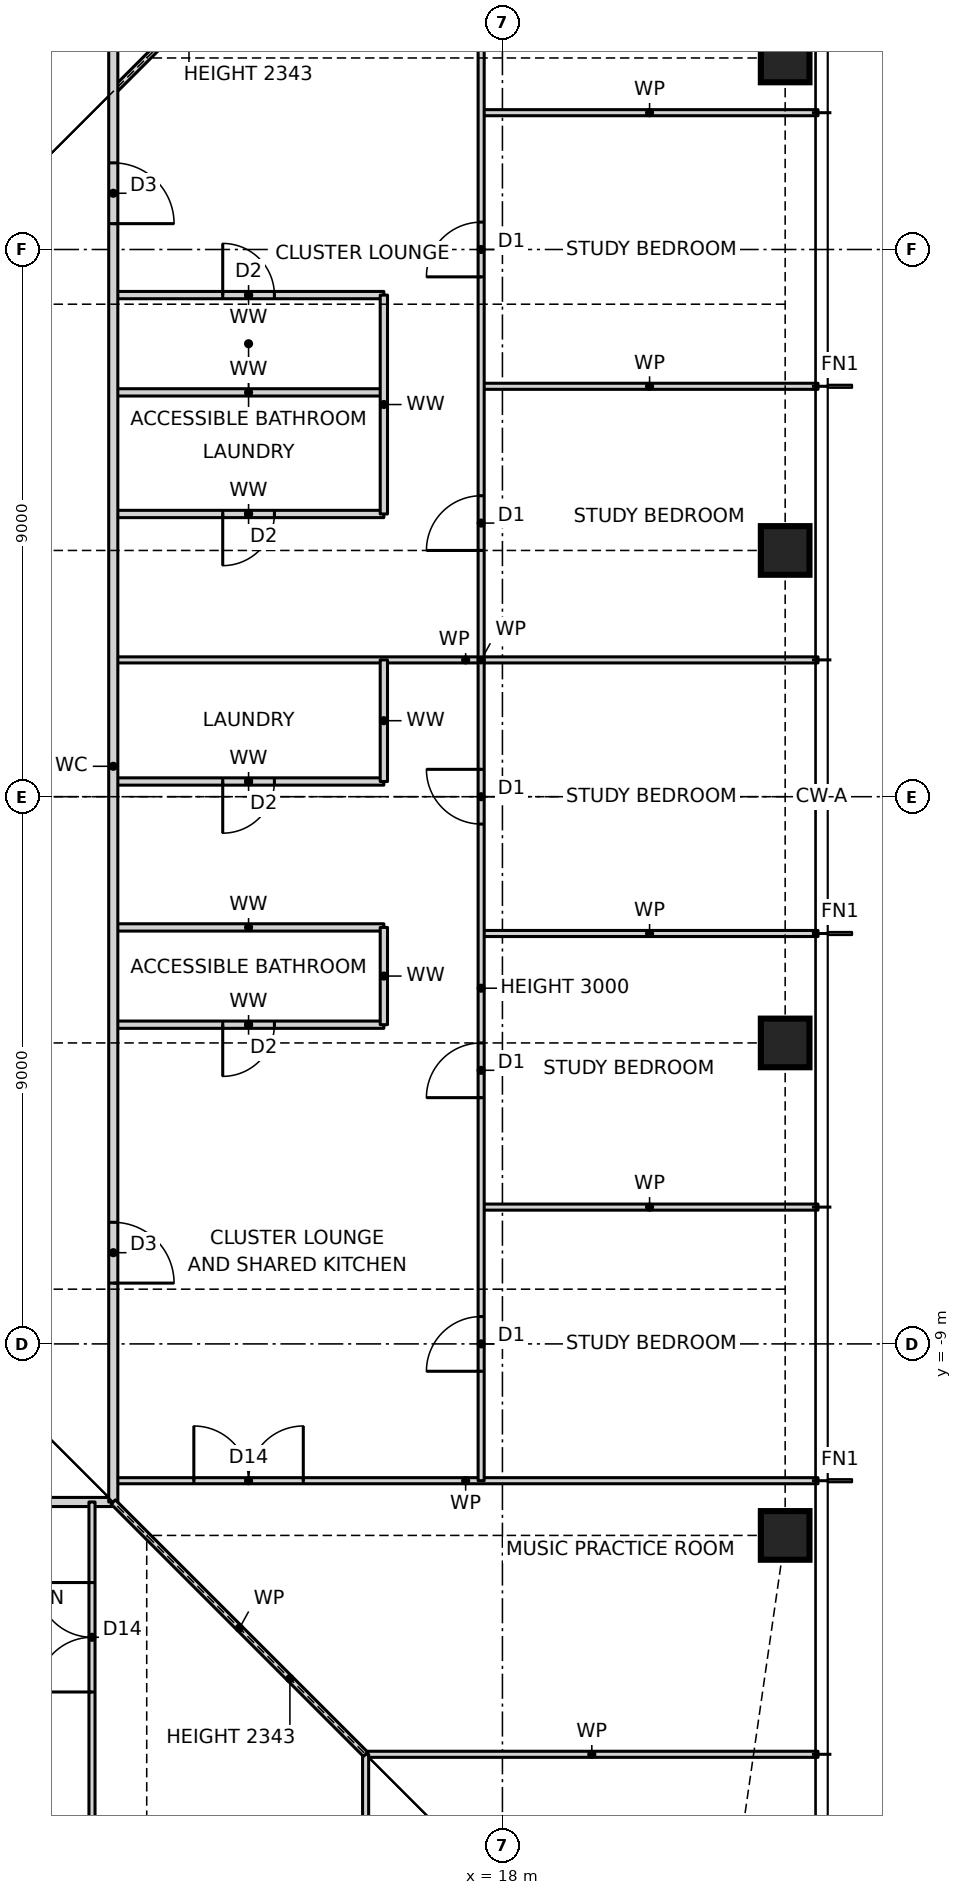
"""IFC4 building model, lengths in metres.
Left out: names, types, materials, properties, quantities, classifications, styles, units other than length and angle.
Written with IfcOpenShell. Run it as: python <this file> out.ifc"""

import sys

from ifc_helpers import new_model, si_unit, direction, frame, frame_2d, origin, origin_2d, place, context, subcontext, project, spatial, rectangle, hollow_rectangle, extrude, element, fill, save


model = new_model("IFC4")
c1 = context("Model", 3, precision=1e-05, world=origin(), true_north=direction((0.0, 1.0)))
c2 = subcontext(c1, "Body", "Model", "MODEL_VIEW")
j1 = project(units=[si_unit("LENGTHUNIT", "METRE"), si_unit("PLANEANGLEUNIT", "RADIAN")], contexts=[c1])
p1 = place(None, origin())
s1 = spatial("IfcSite", under=j1, at=p1, CompositionType="ELEMENT")
p2 = place(p1, origin())
s2 = spatial("IfcBuilding", under=s1, at=p2, CompositionType="ELEMENT")
p3 = place(p2, frame((0.0, 0.0, 43.0)))
s3 = spatial("IfcBuildingStorey", under=s2, at=p3, CompositionType="ELEMENT", Elevation=43.0)
for number, where, z_axis, x_axis in (
    (1, (22.65, -12.15, 0.0), (0.0, 0.0, 1.0), (1.0, 0.0, 0.0)),
    (2, (22.65, -4.05, 0.0), (0.0, 0.0, 1.0), (1.0, 0.0, 0.0)),
    (3, (22.65, 4.05, 0.0), (0.0, 0.0, 1.0), (1.0, 0.0, 0.0)),
    (4, (22.65, 12.15, 0.0), (0.0, 0.0, 1.0), (1.0, 0.0, 0.0)),
):
    element("IfcColumn", number, at=place(p3, frame(where, z_axis=z_axis, x_axis=x_axis)), inside=s3, PredefinedType="COLUMN", context=c2, shape_type="SweptSolid", body=[
        extrude(hollow_rectangle(XDim=0.8, YDim=0.8, WallThickness=0.09, at=origin_2d()), origin(), (0.0, 0.0, 1.0), 3.5),
    ])
p4 = place(p3, frame((15.75, -15.75, 0.0), z_axis=(0.0, 0.0, 1.0), x_axis=(1.0, 0.0, 0.0)))
e5 = element("IfcWall", 5, at=p4, inside=s3, PredefinedType="PARTITIONING", context=c2, shape_type="SweptSolid", body=[
    extrude(rectangle(XDim=7.44, YDim=0.1, at=frame_2d((3.72, 0.0))), origin(), (0.0, 0.0, 1.0), 3.27),
])
p5 = place(p3, frame((-11.6, -11.6, 0.0), z_axis=(0.0, 0.0, 1.0), x_axis=(1.0, 0.0, 0.0)))
e6 = element("IfcWall", 6, at=p5, inside=s3, PredefinedType="PARTITIONING", context=c2, shape_type="SweptSolid", body=[
    extrude(rectangle(XDim=23.2, YDim=0.15, at=frame_2d((11.6, 0.0))), origin(), (0.0, 0.0, 1.0), 3.27),
])
p6 = place(p5, frame((2.975, 0.0, 0.0)))
e7 = element("IfcOpeningElement", 7, at=p6, cuts=e6, PredefinedType="OPENING", context=c2, shape_type="SweptSolid", body=[
    extrude(rectangle(XDim=1.0, YDim=2.1, at=frame_2d((0.5, 1.05))), frame((0.0, 0.085, 0.0), z_axis=(0.0, -1.0, 0.0), x_axis=(1.0, 0.0, 0.0)), (0.0, 0.0, 1.0), 0.17),
])
p7 = place(p5, frame((18.6, 0.0, 0.0)))
e8 = element("IfcOpeningElement", 8, at=p7, cuts=e6, PredefinedType="OPENING", context=c2, shape_type="SweptSolid", body=[
    extrude(rectangle(XDim=1.0, YDim=2.1, at=frame_2d((0.5, 1.05))), frame((0.0, 0.085, 0.0), z_axis=(0.0, -1.0, 0.0), x_axis=(1.0, 0.0, 0.0)), (0.0, 0.0, 1.0), 0.17),
])
p8 = place(p3, frame((11.6, -11.25, 0.0), z_axis=(0.0, 0.0, 1.0), x_axis=(1.0, 0.0, 0.0)))
e9 = element("IfcWall", 9, at=p8, inside=s3, PredefinedType="PARTITIONING", context=c2, shape_type="SweptSolid", body=[
    extrude(rectangle(XDim=11.59, YDim=0.1, at=frame_2d((5.795, 0.0))), origin(), (0.0, 0.0, 1.0), 3.27),
])
p9 = place(p8, frame((1.325, 0.0, 0.0)))
e10 = element("IfcOpeningElement", 10, at=p9, cuts=e9, PredefinedType="OPENING", context=c2, shape_type="SweptSolid", body=[
    extrude(rectangle(XDim=1.8, YDim=2.1, at=frame_2d((0.9, 1.05))), frame((0.0, 0.06, 0.0), z_axis=(0.0, -1.0, 0.0), x_axis=(1.0, 0.0, 0.0)), (0.0, 0.0, 1.0), 0.12),
])
p10 = place(p3, frame((17.65, -6.75, 0.0), z_axis=(0.0, 0.0, 1.0), x_axis=(1.0, 0.0, 0.0)))
e11 = element("IfcWall", 11, at=p10, inside=s3, PredefinedType="PARTITIONING", context=c2, shape_type="SweptSolid", body=[
    extrude(rectangle(XDim=5.54, YDim=0.1, at=frame_2d((2.77, 0.0))), origin(), (0.0, 0.0, 1.0), 3.27),
])
p11 = place(p3, frame((11.6, -3.75, 0.0), z_axis=(0.0, 0.0, 1.0), x_axis=(1.0, 0.0, 0.0)))
e12 = element("IfcWall", 12, at=p11, inside=s3, PredefinedType="PARTITIONING", context=c2, shape_type="SweptSolid", body=[
    extrude(rectangle(XDim=4.45, YDim=0.12, at=frame_2d((2.225, 0.0))), origin(), (0.0, 0.0, 1.0), 3.27),
])
p12 = place(p11, frame((1.8, 0.0, 0.0)))
e13 = element("IfcOpeningElement", 13, at=p12, cuts=e12, PredefinedType="OPENING", context=c2, shape_type="SweptSolid", body=[
    extrude(rectangle(XDim=0.85, YDim=2.1, at=frame_2d((0.425, 1.05))), frame((0.0, 0.07, 0.0), z_axis=(0.0, -1.0, 0.0), x_axis=(1.0, 0.0, 0.0)), (0.0, 0.0, 1.0), 0.14),
])
p13 = place(p3, frame((17.65, -2.25, 0.0), z_axis=(0.0, 0.0, 1.0), x_axis=(1.0, 0.0, 0.0)))
e14 = element("IfcWall", 14, at=p13, inside=s3, PredefinedType="PARTITIONING", context=c2, shape_type="SweptSolid", body=[
    extrude(rectangle(XDim=5.54, YDim=0.1, at=frame_2d((2.77, 0.0))), origin(), (0.0, 0.0, 1.0), 3.27),
])
p14 = place(p3, frame((11.6, -2.15, 0.0), z_axis=(0.0, 0.0, 1.0), x_axis=(1.0, 0.0, 0.0)))
e15 = element("IfcWall", 15, at=p14, inside=s3, PredefinedType="PARTITIONING", context=c2, shape_type="SweptSolid", body=[
    extrude(rectangle(XDim=4.45, YDim=0.12, at=frame_2d((2.225, 0.0))), origin(), (0.0, 0.0, 1.0), 3.27),
])
p15 = place(p3, frame((11.6, 0.25, 0.0), z_axis=(0.0, 0.0, 1.0), x_axis=(1.0, 0.0, 0.0)))
e16 = element("IfcWall", 16, at=p15, inside=s3, PredefinedType="PARTITIONING", context=c2, shape_type="SweptSolid", body=[
    extrude(rectangle(XDim=4.45, YDim=0.12, at=frame_2d((2.225, 0.0))), origin(), (0.0, 0.0, 1.0), 3.27),
])
p16 = place(p15, frame((1.8, 0.0, 0.0)))
e17 = element("IfcOpeningElement", 17, at=p16, cuts=e16, PredefinedType="OPENING", context=c2, shape_type="SweptSolid", body=[
    extrude(rectangle(XDim=0.85, YDim=2.1, at=frame_2d((0.425, 1.05))), frame((0.0, 0.07, 0.0), z_axis=(0.0, -1.0, 0.0), x_axis=(1.0, 0.0, 0.0)), (0.0, 0.0, 1.0), 0.14),
])
p17 = place(p3, frame((11.6, 2.25, 0.0), z_axis=(0.0, 0.0, 1.0), x_axis=(1.0, 0.0, 0.0)))
e18 = element("IfcWall", 18, at=p17, inside=s3, PredefinedType="PARTITIONING", context=c2, shape_type="SweptSolid", body=[
    extrude(rectangle(XDim=11.59, YDim=0.1, at=frame_2d((5.795, 0.0))), origin(), (0.0, 0.0, 1.0), 3.27),
])
p18 = place(p3, frame((11.6, 4.65, 0.0), z_axis=(0.0, 0.0, 1.0), x_axis=(1.0, 0.0, 0.0)))
e19 = element("IfcWall", 19, at=p18, inside=s3, PredefinedType="PARTITIONING", context=c2, shape_type="SweptSolid", body=[
    extrude(rectangle(XDim=4.45, YDim=0.12, at=frame_2d((2.225, 0.0))), origin(), (0.0, 0.0, 1.0), 3.27),
])
p19 = place(p18, frame((1.8, 0.0, 0.0)))
e20 = element("IfcOpeningElement", 20, at=p19, cuts=e19, PredefinedType="OPENING", context=c2, shape_type="SweptSolid", body=[
    extrude(rectangle(XDim=0.85, YDim=2.1, at=frame_2d((0.425, 1.05))), frame((0.0, 0.07, 0.0), z_axis=(0.0, -1.0, 0.0), x_axis=(1.0, 0.0, 0.0)), (0.0, 0.0, 1.0), 0.14),
])
p20 = place(p3, frame((11.6, 6.65, 0.0), z_axis=(0.0, 0.0, 1.0), x_axis=(1.0, 0.0, 0.0)))
e21 = element("IfcWall", 21, at=p20, inside=s3, PredefinedType="PARTITIONING", context=c2, shape_type="SweptSolid", body=[
    extrude(rectangle(XDim=4.45, YDim=0.12, at=frame_2d((2.225, 0.0))), origin(), (0.0, 0.0, 1.0), 3.27),
])
p21 = place(p3, frame((17.65, 6.75, 0.0), z_axis=(0.0, 0.0, 1.0), x_axis=(1.0, 0.0, 0.0)))
e22 = element("IfcWall", 22, at=p21, inside=s3, PredefinedType="PARTITIONING", context=c2, shape_type="SweptSolid", body=[
    extrude(rectangle(XDim=5.54, YDim=0.1, at=frame_2d((2.77, 0.0))), origin(), (0.0, 0.0, 1.0), 3.27),
])
p22 = place(p3, frame((11.6, 8.25, 0.0), z_axis=(0.0, 0.0, 1.0), x_axis=(1.0, 0.0, 0.0)))
e23 = element("IfcWall", 23, at=p22, inside=s3, PredefinedType="PARTITIONING", context=c2, shape_type="SweptSolid", body=[
    extrude(rectangle(XDim=4.45, YDim=0.12, at=frame_2d((2.225, 0.0))), origin(), (0.0, 0.0, 1.0), 3.27),
])
p23 = place(p22, frame((1.8, 0.0, 0.0)))
e24 = element("IfcOpeningElement", 24, at=p23, cuts=e23, PredefinedType="OPENING", context=c2, shape_type="SweptSolid", body=[
    extrude(rectangle(XDim=0.85, YDim=2.1, at=frame_2d((0.425, 1.05))), frame((0.0, 0.07, 0.0), z_axis=(0.0, -1.0, 0.0), x_axis=(1.0, 0.0, 0.0)), (0.0, 0.0, 1.0), 0.14),
])
p24 = place(p3, frame((17.65, 11.25, 0.0), z_axis=(0.0, 0.0, 1.0), x_axis=(1.0, 0.0, 0.0)))
e25 = element("IfcWall", 25, at=p24, inside=s3, PredefinedType="PARTITIONING", context=c2, shape_type="SweptSolid", body=[
    extrude(rectangle(XDim=5.54, YDim=0.1, at=frame_2d((2.77, 0.0))), origin(), (0.0, 0.0, 1.0), 3.27),
])
p25 = place(p3, frame((11.6, 11.6, 0.0), z_axis=(0.0, 0.0, 1.0), x_axis=(0.707106781187, 0.707106781187, 0.0)))
e26 = element("IfcWall", 26, at=p25, inside=s3, PredefinedType="PARTITIONING", context=c2, shape_type="SweptSolid", body=[
    extrude(rectangle(XDim=5.869, YDim=0.1, at=frame_2d((2.935, 0.0))), origin(), (0.0, 0.0, 1.0), 2.343),
])
p26 = place(p3, frame((17.65, -11.25, 0.0), z_axis=(0.0, 0.0, 1.0), x_axis=(0.0, 1.0, 0.0)))
e27 = element("IfcWall", 27, at=p26, inside=s3, PredefinedType="PARTITIONING", context=c2, shape_type="SweptSolid", body=[
    extrude(rectangle(XDim=27.0, YDim=0.1, at=frame_2d((13.5, 0.0))), origin(), (0.0, 0.0, 1.0), 3.0),
])
p27 = place(p26, frame((1.8, 0.0, 0.0)))
e28 = element("IfcOpeningElement", 28, at=p27, cuts=e27, PredefinedType="OPENING", context=c2, shape_type="SweptSolid", body=[
    extrude(rectangle(XDim=0.9, YDim=2.1, at=frame_2d((0.45, 1.05))), frame((0.0, 0.06, 0.0), z_axis=(0.0, -1.0, 0.0), x_axis=(1.0, 0.0, 0.0)), (0.0, 0.0, 1.0), 0.12),
])
p28 = place(p26, frame((6.3, 0.0, 0.0)))
e29 = element("IfcOpeningElement", 29, at=p28, cuts=e27, PredefinedType="OPENING", context=c2, shape_type="SweptSolid", body=[
    extrude(rectangle(XDim=0.9, YDim=2.1, at=frame_2d((0.45, 1.05))), frame((0.0, 0.06, 0.0), z_axis=(0.0, -1.0, 0.0), x_axis=(1.0, 0.0, 0.0)), (0.0, 0.0, 1.0), 0.12),
])
p29 = place(p26, frame((10.8, 0.0, 0.0)))
e30 = element("IfcOpeningElement", 30, at=p29, cuts=e27, PredefinedType="OPENING", context=c2, shape_type="SweptSolid", body=[
    extrude(rectangle(XDim=0.9, YDim=2.1, at=frame_2d((0.45, 1.05))), frame((0.0, 0.06, 0.0), z_axis=(0.0, -1.0, 0.0), x_axis=(1.0, 0.0, 0.0)), (0.0, 0.0, 1.0), 0.12),
])
p30 = place(p26, frame((15.3, 0.0, 0.0)))
e31 = element("IfcOpeningElement", 31, at=p30, cuts=e27, PredefinedType="OPENING", context=c2, shape_type="SweptSolid", body=[
    extrude(rectangle(XDim=0.9, YDim=2.1, at=frame_2d((0.45, 1.05))), frame((0.0, 0.06, 0.0), z_axis=(0.0, -1.0, 0.0), x_axis=(1.0, 0.0, 0.0)), (0.0, 0.0, 1.0), 0.12),
])
p31 = place(p26, frame((19.8, 0.0, 0.0)))
e32 = element("IfcOpeningElement", 32, at=p31, cuts=e27, PredefinedType="OPENING", context=c2, shape_type="SweptSolid", body=[
    extrude(rectangle(XDim=0.9, YDim=2.1, at=frame_2d((0.45, 1.05))), frame((0.0, 0.06, 0.0), z_axis=(0.0, -1.0, 0.0), x_axis=(1.0, 0.0, 0.0)), (0.0, 0.0, 1.0), 0.12),
])
p32 = place(p26, frame((24.3, 0.0, 0.0)))
e33 = element("IfcOpeningElement", 33, at=p32, cuts=e27, PredefinedType="OPENING", context=c2, shape_type="SweptSolid", body=[
    extrude(rectangle(XDim=0.9, YDim=2.1, at=frame_2d((0.45, 1.05))), frame((0.0, 0.06, 0.0), z_axis=(0.0, -1.0, 0.0), x_axis=(1.0, 0.0, 0.0)), (0.0, 0.0, 1.0), 0.12),
])
p33 = place(p3, frame((16.05, -3.75, 0.0), z_axis=(0.0, 0.0, 1.0), x_axis=(0.0, 1.0, 0.0)))
e34 = element("IfcWall", 34, at=p33, inside=s3, PredefinedType="PARTITIONING", context=c2, shape_type="SweptSolid", body=[
    extrude(rectangle(XDim=1.6, YDim=0.12, at=frame_2d((0.8, 0.0))), origin(), (0.0, 0.0, 1.0), 3.27),
])
p34 = place(p3, frame((16.05, 0.25, 0.0), z_axis=(0.0, 0.0, 1.0), x_axis=(0.0, 1.0, 0.0)))
e35 = element("IfcWall", 35, at=p34, inside=s3, PredefinedType="PARTITIONING", context=c2, shape_type="SweptSolid", body=[
    extrude(rectangle(XDim=2.0, YDim=0.12, at=frame_2d((1.0, 0.0))), origin(), (0.0, 0.0, 1.0), 3.27),
])
p35 = place(p3, frame((16.05, 4.65, 0.0), z_axis=(0.0, 0.0, 1.0), x_axis=(0.0, 1.0, 0.0)))
e36 = element("IfcWall", 36, at=p35, inside=s3, PredefinedType="PARTITIONING", context=c2, shape_type="SweptSolid", body=[
    extrude(rectangle(XDim=3.6, YDim=0.12, at=frame_2d((1.8, 0.0))), origin(), (0.0, 0.0, 1.0), 3.27),
])
p36 = place(p3, frame((15.75, -23.19, 0.0), z_axis=(0.0, 0.0, 1.0), x_axis=(0.0, 1.0, 0.0)))
e37 = element("IfcWall", 37, at=p36, inside=s3, PredefinedType="PARTITIONING", context=c2, shape_type="SweptSolid", body=[
    extrude(rectangle(XDim=7.44, YDim=0.1, at=frame_2d((3.72, 0.0))), origin(), (0.0, 0.0, 1.0), 3.27),
])
p37 = place(p36, frame((3.295, 0.0, 0.0)))
e38 = element("IfcOpeningElement", 38, at=p37, cuts=e37, PredefinedType="OPENING", context=c2, shape_type="SweptSolid", body=[
    extrude(rectangle(XDim=0.85, YDim=2.1, at=frame_2d((0.425, 1.05))), frame((0.0, 0.06, 0.0), z_axis=(0.0, -1.0, 0.0), x_axis=(1.0, 0.0, 0.0)), (0.0, 0.0, 1.0), 0.12),
])
p38 = place(p3, frame((11.6, -11.6, 0.0), z_axis=(0.0, 0.0, 1.0), x_axis=(0.0, 1.0, 0.0)))
e39 = element("IfcWall", 39, at=p38, inside=s3, PredefinedType="PARTITIONING", context=c2, shape_type="SweptSolid", body=[
    extrude(rectangle(XDim=24.2, YDim=0.15, at=frame_2d((12.1, 0.0))), origin(), (0.0, 0.0, 1.0), 3.27),
])
p39 = place(p38, frame((3.6, 0.0, 0.0)))
e40 = element("IfcOpeningElement", 40, at=p39, cuts=e39, PredefinedType="OPENING", context=c2, shape_type="SweptSolid", body=[
    extrude(rectangle(XDim=1.0, YDim=2.1, at=frame_2d((0.5, 1.05))), frame((0.0, 0.085, 0.0), z_axis=(0.0, -1.0, 0.0), x_axis=(1.0, 0.0, 0.0)), (0.0, 0.0, 1.0), 0.17),
])
p40 = place(p38, frame((21.025, 0.0, 0.0)))
e41 = element("IfcOpeningElement", 41, at=p40, cuts=e39, PredefinedType="OPENING", context=c2, shape_type="SweptSolid", body=[
    extrude(rectangle(XDim=1.0, YDim=2.1, at=frame_2d((0.5, 1.05))), frame((0.0, 0.085, 0.0), z_axis=(0.0, -1.0, 0.0), x_axis=(1.0, 0.0, 0.0)), (0.0, 0.0, 1.0), 0.17),
])
p41 = place(p3, frame((11.25, -23.19, 0.0), z_axis=(0.0, 0.0, 1.0), x_axis=(0.0, 1.0, 0.0)))
e42 = element("IfcWall", 42, at=p41, inside=s3, PredefinedType="PARTITIONING", context=c2, shape_type="SweptSolid", body=[
    extrude(rectangle(XDim=11.59, YDim=0.1, at=frame_2d((5.795, 0.0))), origin(), (0.0, 0.0, 1.0), 3.27),
])
p42 = place(p41, frame((8.465, 0.0, 0.0)))
e43 = element("IfcOpeningElement", 43, at=p42, cuts=e42, PredefinedType="OPENING", context=c2, shape_type="SweptSolid", body=[
    extrude(rectangle(XDim=1.8, YDim=2.1, at=frame_2d((0.9, 1.05))), frame((0.0, 0.06, 0.0), z_axis=(0.0, -1.0, 0.0), x_axis=(1.0, 0.0, 0.0)), (0.0, 0.0, 1.0), 0.12),
])
p43 = place(p3, frame((15.75, -15.75, 0.0), z_axis=(0.0, 0.0, 1.0), x_axis=(-0.707106781187, 0.707106781187, 0.0)))
e44 = element("IfcWall", 44, at=p43, inside=s3, PredefinedType="PARTITIONING", context=c2, shape_type="SweptSolid", body=[
    extrude(rectangle(XDim=5.869, YDim=0.1, at=frame_2d((2.935, 0.0))), origin(), (0.0, 0.0, 1.0), 2.343),
])
p44 = place(p42, origin())
e45 = element("IfcDoor", 45, at=p44, inside=s3, OperationType="DOUBLE_DOOR_SINGLE_SWING", PredefinedType="DOOR", context=c2, shape_type="SweptSolid", body=[
    extrude(rectangle(XDim=1.8, YDim=2.1, at=frame_2d((0.9, 1.05))), frame((0.0, 0.025, 0.0), z_axis=(0.0, -1.0, 0.0), x_axis=(1.0, 0.0, 0.0)), (0.0, 0.0, 1.0), 0.05),
])
fill(e43, e45)
p45 = place(p9, origin())
e46 = element("IfcDoor", 46, at=p45, inside=s3, OperationType="DOUBLE_DOOR_SINGLE_SWING", PredefinedType="DOOR", context=c2, shape_type="SweptSolid", body=[
    extrude(rectangle(XDim=1.8, YDim=2.1, at=frame_2d((0.9, 1.05))), frame((0.0, 0.025, 0.0), z_axis=(0.0, -1.0, 0.0), x_axis=(1.0, 0.0, 0.0)), (0.0, 0.0, 1.0), 0.05),
])
fill(e10, e46)
p46 = place(p27, origin())
e47 = element("IfcDoor", 47, at=p46, inside=s3, OperationType="SINGLE_SWING_LEFT", PredefinedType="DOOR", context=c2, shape_type="SweptSolid", body=[
    extrude(rectangle(XDim=0.9, YDim=2.1, at=frame_2d((0.45, 1.05))), frame((0.0, 0.025, 0.0), z_axis=(0.0, -1.0, 0.0), x_axis=(1.0, 0.0, 0.0)), (0.0, 0.0, 1.0), 0.05),
])
fill(e28, e47)
p47 = place(p28, origin())
e48 = element("IfcDoor", 48, at=p47, inside=s3, OperationType="SINGLE_SWING_LEFT", PredefinedType="DOOR", context=c2, shape_type="SweptSolid", body=[
    extrude(rectangle(XDim=0.9, YDim=2.1, at=frame_2d((0.45, 1.05))), frame((0.0, 0.025, 0.0), z_axis=(0.0, -1.0, 0.0), x_axis=(1.0, 0.0, 0.0)), (0.0, 0.0, 1.0), 0.05),
])
fill(e29, e48)
p48 = place(p29, origin())
e49 = element("IfcDoor", 49, at=p48, inside=s3, OperationType="SINGLE_SWING_RIGHT", PredefinedType="DOOR", context=c2, shape_type="SweptSolid", body=[
    extrude(rectangle(XDim=0.9, YDim=2.1, at=frame_2d((0.45, 1.05))), frame((0.0, 0.025, 0.0), z_axis=(0.0, -1.0, 0.0), x_axis=(1.0, 0.0, 0.0)), (0.0, 0.0, 1.0), 0.05),
])
fill(e30, e49)
p49 = place(p39, frame((1.0, 0.0, 0.0), z_axis=(0.0, 0.0, 1.0), x_axis=(-1.0, 0.0, 0.0)))
e50 = element("IfcDoor", 50, at=p49, inside=s3, OperationType="SINGLE_SWING_RIGHT", PredefinedType="DOOR", context=c2, shape_type="SweptSolid", body=[
    extrude(rectangle(XDim=1.0, YDim=2.1, at=frame_2d((0.5, 1.05))), frame((0.0, 0.025, 0.0), z_axis=(0.0, -1.0, 0.0), x_axis=(1.0, 0.0, 0.0)), (0.0, 0.0, 1.0), 0.05),
])
fill(e40, e50)
p50 = place(p12, frame((0.85, 0.0, 0.0), z_axis=(0.0, 0.0, 1.0), x_axis=(-1.0, 0.0, 0.0)))
e51 = element("IfcDoor", 51, at=p50, inside=s3, OperationType="SINGLE_SWING_RIGHT", PredefinedType="DOOR", context=c2, shape_type="SweptSolid", body=[
    extrude(rectangle(XDim=0.85, YDim=2.1, at=frame_2d((0.425, 1.05))), frame((0.0, 0.025, 0.0), z_axis=(0.0, -1.0, 0.0), x_axis=(1.0, 0.0, 0.0)), (0.0, 0.0, 1.0), 0.05),
])
fill(e13, e51)
p51 = place(p16, frame((0.85, 0.0, 0.0), z_axis=(0.0, 0.0, 1.0), x_axis=(-1.0, 0.0, 0.0)))
e52 = element("IfcDoor", 52, at=p51, inside=s3, OperationType="SINGLE_SWING_RIGHT", PredefinedType="DOOR", context=c2, shape_type="SweptSolid", body=[
    extrude(rectangle(XDim=0.85, YDim=2.1, at=frame_2d((0.425, 1.05))), frame((0.0, 0.025, 0.0), z_axis=(0.0, -1.0, 0.0), x_axis=(1.0, 0.0, 0.0)), (0.0, 0.0, 1.0), 0.05),
])
fill(e17, e52)
p52 = place(p30, origin())
e53 = element("IfcDoor", 53, at=p52, inside=s3, OperationType="SINGLE_SWING_LEFT", PredefinedType="DOOR", context=c2, shape_type="SweptSolid", body=[
    extrude(rectangle(XDim=0.9, YDim=2.1, at=frame_2d((0.45, 1.05))), frame((0.0, 0.025, 0.0), z_axis=(0.0, -1.0, 0.0), x_axis=(1.0, 0.0, 0.0)), (0.0, 0.0, 1.0), 0.05),
])
fill(e31, e53)
p53 = place(p31, origin())
e54 = element("IfcDoor", 54, at=p53, inside=s3, OperationType="SINGLE_SWING_LEFT", PredefinedType="DOOR", context=c2, shape_type="SweptSolid", body=[
    extrude(rectangle(XDim=0.9, YDim=2.1, at=frame_2d((0.45, 1.05))), frame((0.0, 0.025, 0.0), z_axis=(0.0, -1.0, 0.0), x_axis=(1.0, 0.0, 0.0)), (0.0, 0.0, 1.0), 0.05),
])
fill(e32, e54)
p54 = place(p40, frame((1.0, 0.0, 0.0), z_axis=(0.0, 0.0, 1.0), x_axis=(-1.0, 0.0, 0.0)))
e55 = element("IfcDoor", 55, at=p54, inside=s3, OperationType="SINGLE_SWING_RIGHT", PredefinedType="DOOR", context=c2, shape_type="SweptSolid", body=[
    extrude(rectangle(XDim=1.0, YDim=2.1, at=frame_2d((0.5, 1.05))), frame((0.0, 0.025, 0.0), z_axis=(0.0, -1.0, 0.0), x_axis=(1.0, 0.0, 0.0)), (0.0, 0.0, 1.0), 0.05),
])
fill(e41, e55)
p55 = place(p19, frame((0.85, 0.0, 0.0), z_axis=(0.0, 0.0, 1.0), x_axis=(-1.0, 0.0, 0.0)))
e56 = element("IfcDoor", 56, at=p55, inside=s3, OperationType="SINGLE_SWING_RIGHT", PredefinedType="DOOR", context=c2, shape_type="SweptSolid", body=[
    extrude(rectangle(XDim=0.85, YDim=2.1, at=frame_2d((0.425, 1.05))), frame((0.0, 0.025, 0.0), z_axis=(0.0, -1.0, 0.0), x_axis=(1.0, 0.0, 0.0)), (0.0, 0.0, 1.0), 0.05),
])
fill(e20, e56)
p56 = place(p23, origin())
e57 = element("IfcDoor", 57, at=p56, inside=s3, OperationType="SINGLE_SWING_LEFT", PredefinedType="DOOR", context=c2, shape_type="SweptSolid", body=[
    extrude(rectangle(XDim=0.85, YDim=2.1, at=frame_2d((0.425, 1.05))), frame((0.0, 0.025, 0.0), z_axis=(0.0, -1.0, 0.0), x_axis=(1.0, 0.0, 0.0)), (0.0, 0.0, 1.0), 0.05),
])
fill(e24, e57)
save(model, sys.argv[1])
